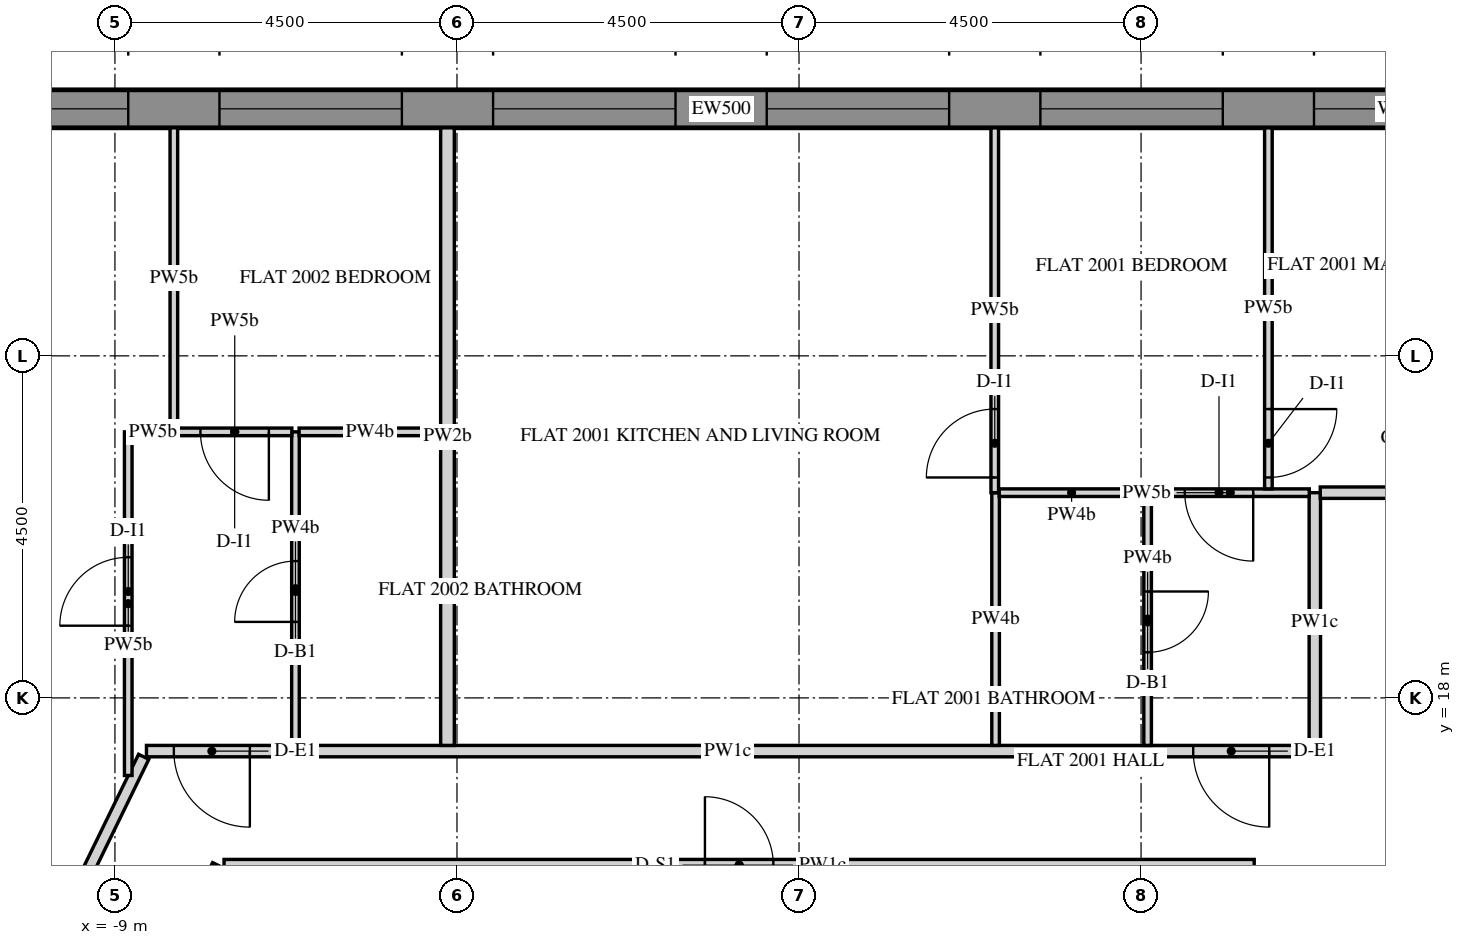
"""IFC4 building model, lengths in metres.
Left out: names, types, materials, properties, quantities, classifications, styles, units other than length and angle.
Written with IfcOpenShell. Run it as: python <this file> out.ifc"""

import sys

from ifc_helpers import new_model, si_unit, direction, frame, frame_2d, origin, place, context, subcontext, project, spatial, polyline, rectangle, outline, extrude, element, fill, save


model = new_model("IFC4")
c1 = context("Model", 3, precision=1e-05, world=origin(), true_north=direction((0.0, 1.0)))
c2 = subcontext(c1, "Body", "Model", "MODEL_VIEW")
j1 = project(units=[si_unit("LENGTHUNIT", "METRE"), si_unit("PLANEANGLEUNIT", "RADIAN")], contexts=[c1])
p1 = place(None, origin())
s1 = spatial("IfcSite", under=j1, at=p1, CompositionType="ELEMENT")
p2 = place(p1, origin())
s2 = spatial("IfcBuilding", under=s1, at=p2, CompositionType="ELEMENT")
p3 = place(p2, frame((0.0, 0.0, 260.1)))
s3 = spatial("IfcBuildingStorey", under=s2, at=p3, CompositionType="ELEMENT", Elevation=260.1)
p4 = place(p3, frame((11.698, 25.75, -0.15), z_axis=(0.0, 0.0, 1.0), x_axis=(-1.0, 0.0, 0.0)))
e1 = element("IfcWall", 1, at=p4, inside=s3, PredefinedType="SOLIDWALL", context=c2, shape_type="SweptSolid", body=[
    extrude(outline(polyline([(-0.021, -0.25), (25.468, -0.25), (25.421, 0.25), (0.021, 0.25), (-0.021, -0.25)])), origin(), (0.0, 0.0, 1.0), 3.9),
])
p5 = place(p4, frame((2.522, 0.0, 0.75)))
e2 = element("IfcOpeningElement", 2, at=p5, cuts=e1, PredefinedType="OPENING", context=c2, shape_type="SweptSolid", body=[
    extrude(rectangle(XDim=2.4, YDim=2.7, at=frame_2d((1.2, 1.35))), frame((0.0, 0.26, 0.0), z_axis=(0.0, -1.0, 0.0), x_axis=(1.0, 0.0, 0.0)), (0.0, 0.0, 1.0), 0.52),
])
p6 = place(p4, frame((6.122, 0.0, 0.75)))
e3 = element("IfcOpeningElement", 3, at=p6, cuts=e1, PredefinedType="OPENING", context=c2, shape_type="SweptSolid", body=[
    extrude(rectangle(XDim=2.4, YDim=2.7, at=frame_2d((1.2, 1.35))), frame((0.0, 0.26, 0.0), z_axis=(0.0, -1.0, 0.0), x_axis=(1.0, 0.0, 0.0)), (0.0, 0.0, 1.0), 0.52),
])
p7 = place(p4, frame((9.722, 0.0, 0.75)))
e4 = element("IfcOpeningElement", 4, at=p7, cuts=e1, PredefinedType="OPENING", context=c2, shape_type="SweptSolid", body=[
    extrude(rectangle(XDim=2.4, YDim=2.7, at=frame_2d((1.2, 1.35))), frame((0.0, 0.26, 0.0), z_axis=(0.0, -1.0, 0.0), x_axis=(1.0, 0.0, 0.0)), (0.0, 0.0, 1.0), 0.52),
])
p8 = place(p4, frame((13.323, 0.0, 0.75)))
e5 = element("IfcOpeningElement", 5, at=p8, cuts=e1, PredefinedType="OPENING", context=c2, shape_type="SweptSolid", body=[
    extrude(rectangle(XDim=2.4, YDim=2.7, at=frame_2d((1.2, 1.35))), frame((0.0, 0.26, 0.0), z_axis=(0.0, -1.0, 0.0), x_axis=(1.0, 0.0, 0.0)), (0.0, 0.0, 1.0), 0.52),
])
p9 = place(p4, frame((16.922, 0.0, 0.75)))
e6 = element("IfcOpeningElement", 6, at=p9, cuts=e1, PredefinedType="OPENING", context=c2, shape_type="SweptSolid", body=[
    extrude(rectangle(XDim=2.4, YDim=2.7, at=frame_2d((1.2, 1.35))), frame((0.0, 0.26, 0.0), z_axis=(0.0, -1.0, 0.0), x_axis=(1.0, 0.0, 0.0)), (0.0, 0.0, 1.0), 0.52),
])
p10 = place(p4, frame((20.522, 0.0, 0.75)))
e7 = element("IfcOpeningElement", 7, at=p10, cuts=e1, PredefinedType="OPENING", context=c2, shape_type="SweptSolid", body=[
    extrude(rectangle(XDim=2.4, YDim=2.7, at=frame_2d((1.2, 1.35))), frame((0.0, 0.26, 0.0), z_axis=(0.0, -1.0, 0.0), x_axis=(1.0, 0.0, 0.0)), (0.0, 0.0, 1.0), 0.52),
])
p11 = place(p3, frame((6.351, 11.0, -0.15), z_axis=(0.0, 0.0, 1.0), x_axis=(0.499998894578, 0.866026041999, 0.0)))
e8 = element("IfcWall", 8, at=p11, inside=s3, PredefinedType="SHEAR", context=c2, shape_type="SweptSolid", body=[
    extrude(rectangle(XDim=15.544, YDim=0.4, at=frame_2d((7.772, 0.0))), origin(), (0.0, 0.0, 1.0), 3.9),
])
p12 = place(p11, frame((6.872, 0.0, 0.15)))
e9 = element("IfcOpeningElement", 9, at=p12, cuts=e8, PredefinedType="OPENING", context=c2, shape_type="SweptSolid", body=[
    extrude(rectangle(XDim=1.8, YDim=2.4, at=frame_2d((0.9, 1.2))), frame((0.0, 0.21, 0.0), z_axis=(0.0, -1.0, 0.0), x_axis=(1.0, 0.0, 0.0)), (0.0, 0.0, 1.0), 0.42),
])
p13 = place(p3, frame((6.711, 17.3, 0.0), z_axis=(0.0, 0.0, 1.0), x_axis=(-1.0, 0.0, 0.0)))
e10 = element("IfcWall", 10, at=p13, inside=s3, PredefinedType="PARTITIONING", context=c2, shape_type="SweptSolid", body=[
    extrude(rectangle(XDim=15.296, YDim=0.15, at=frame_2d((7.648, 0.0))), origin(), (0.0, 0.0, 1.0), 2.823),
])
p14 = place(p13, frame((0.525, 0.0, 0.0)))
e11 = element("IfcOpeningElement", 11, at=p14, cuts=e10, PredefinedType="OPENING", context=c2, shape_type="SweptSolid", body=[
    extrude(rectangle(XDim=1.0, YDim=2.1, at=frame_2d((0.5, 1.05))), frame((0.0, 0.085, 0.0), z_axis=(0.0, -1.0, 0.0), x_axis=(1.0, 0.0, 0.0)), (0.0, 0.0, 1.0), 0.17),
])
p15 = place(p13, frame((13.936, 0.0, 0.0)))
e12 = element("IfcOpeningElement", 12, at=p15, cuts=e10, PredefinedType="OPENING", context=c2, shape_type="SweptSolid", body=[
    extrude(rectangle(XDim=1.0, YDim=2.1, at=frame_2d((0.5, 1.05))), frame((0.0, 0.085, 0.0), z_axis=(0.0, -1.0, 0.0), x_axis=(1.0, 0.0, 0.0)), (0.0, 0.0, 1.0), 0.17),
])
p16 = place(p3, frame((6.786, 20.7, 0.0), z_axis=(0.0, 0.0, 1.0), x_axis=(0.0, -1.0, 0.0)))
e13 = element("IfcWall", 13, at=p16, inside=s3, PredefinedType="PARTITIONING", context=c2, shape_type="SweptSolid", body=[
    extrude(rectangle(XDim=3.4, YDim=0.15, at=frame_2d((1.7, 0.0))), origin(), (0.0, 0.0, 1.0), 2.823),
])
p17 = place(p3, frame((9.774, 20.7, 0.0), z_axis=(0.0, 0.0, 1.0), x_axis=(-1.0, 0.0, 0.0)))
e14 = element("IfcWall", 14, at=p17, inside=s3, PredefinedType="PARTITIONING", context=c2, shape_type="SweptSolid", body=[
    extrude(rectangle(XDim=2.916, YDim=0.15, at=frame_2d((1.458, 0.0))), origin(), (0.0, 0.0, 1.0), 2.823),
])
p18 = place(p3, frame((-8.622, 17.225, 0.0), z_axis=(0.0, 0.0, 1.0), x_axis=(-0.438366544921, -0.898796290765, 0.0)))
e15 = element("IfcWall", 15, at=p18, inside=s3, PredefinedType="PARTITIONING", context=c2, shape_type="SweptSolid", body=[
    extrude(rectangle(XDim=17.273, YDim=0.15, at=frame_2d((8.637, 0.0))), origin(), (0.0, 0.0, 1.0), 2.823),
])
p19 = place(p18, frame((6.478, 0.0, 0.0)))
e16 = element("IfcOpeningElement", 16, at=p19, cuts=e15, PredefinedType="OPENING", context=c2, shape_type="SweptSolid", body=[
    extrude(rectangle(XDim=1.0, YDim=2.1, at=frame_2d((0.5, 1.05))), frame((0.0, 0.085, 0.0), z_axis=(0.0, -1.0, 0.0), x_axis=(1.0, 0.0, 0.0)), (0.0, 0.0, 1.0), 0.17),
])
p20 = place(p3, frame((-11.499, 7.905, 0.0), z_axis=(0.0, 0.0, 1.0), x_axis=(0.438365041944, 0.898797023805, 0.0)))
e17 = element("IfcWall", 17, at=p20, inside=s3, PredefinedType="PARTITIONING", context=c2, shape_type="SweptSolid", body=[
    extrude(rectangle(XDim=8.784, YDim=0.15, at=frame_2d((4.392, 0.0))), origin(), (0.0, 0.0, 1.0), 2.823),
])
p21 = place(p3, frame((-7.564, 15.8, 0.0), z_axis=(0.0, 0.0, 1.0), x_axis=(1.0, 0.0, 0.0)))
e18 = element("IfcWall", 18, at=p21, inside=s3, PredefinedType="PARTITIONING", context=c2, shape_type="SweptSolid", body=[
    extrude(rectangle(XDim=13.553, YDim=0.15, at=frame_2d((6.776, 0.0))), origin(), (0.0, 0.0, 1.0), 2.823),
])
p22 = place(p21, frame((6.326, 0.0, 0.0)))
e19 = element("IfcOpeningElement", 19, at=p22, cuts=e18, PredefinedType="OPENING", context=c2, shape_type="SweptSolid", body=[
    extrude(rectangle(XDim=0.9, YDim=2.1, at=frame_2d((0.45, 1.05))), frame((0.0, 0.085, 0.0), z_axis=(0.0, -1.0, 0.0), x_axis=(1.0, 0.0, 0.0)), (0.0, 0.0, 1.0), 0.17),
])
p23 = place(p3, frame((2.586, 17.375, 0.0), z_axis=(0.0, 0.0, 1.0), x_axis=(0.0, 1.0, 0.0)))
e20 = element("IfcWall", 20, at=p23, inside=s3, PredefinedType="PARTITIONING", context=c2, shape_type="SweptSolid", body=[
    extrude(rectangle(XDim=3.325, YDim=0.1, at=frame_2d((1.663, 0.0))), origin(), (0.0, 0.0, 1.0), 2.823),
])
p24 = place(p3, frame((2.575, 20.7, 0.0), z_axis=(0.0, 0.0, 1.0), x_axis=(0.0, 1.0, 0.0)))
e21 = element("IfcWall", 21, at=p24, inside=s3, PredefinedType="PARTITIONING", context=c2, shape_type="SweptSolid", body=[
    extrude(rectangle(XDim=4.8, YDim=0.1, at=frame_2d((2.4, 0.0))), origin(), (0.0, 0.0, 1.0), 2.823),
])
p25 = place(p24, frame((0.2, 0.0, 0.0)))
e22 = element("IfcOpeningElement", 22, at=p25, cuts=e21, PredefinedType="OPENING", context=c2, shape_type="SweptSolid", body=[
    extrude(rectangle(XDim=0.9, YDim=2.1, at=frame_2d((0.45, 1.05))), frame((0.0, 0.06, 0.0), z_axis=(0.0, -1.0, 0.0), x_axis=(1.0, 0.0, 0.0)), (0.0, 0.0, 1.0), 0.12),
])
p26 = place(p3, frame((-4.625, 25.5, 0.0), z_axis=(0.0, 0.0, 1.0), x_axis=(0.0, -1.0, 0.0)))
e23 = element("IfcWall", 23, at=p26, inside=s3, PredefinedType="PARTITIONING", context=c2, shape_type="SweptSolid", body=[
    extrude(rectangle(XDim=8.125, YDim=0.18, at=frame_2d((4.062, 0.0))), origin(), (0.0, 0.0, 1.0), 2.823),
])
p27 = place(p3, frame((4.586, 20.7, 0.0), z_axis=(0.0, 0.0, 1.0), x_axis=(0.0, -1.0, 0.0)))
e24 = element("IfcWall", 24, at=p27, inside=s3, PredefinedType="PARTITIONING", context=c2, shape_type="SweptSolid", body=[
    extrude(rectangle(XDim=3.325, YDim=0.1, at=frame_2d((1.663, 0.0))), origin(), (0.0, 0.0, 1.0), 2.823),
])
p28 = place(p27, frame((1.3, 0.0, 0.0)))
e25 = element("IfcOpeningElement", 25, at=p28, cuts=e24, PredefinedType="OPENING", context=c2, shape_type="SweptSolid", body=[
    extrude(rectangle(XDim=0.8, YDim=2.1, at=frame_2d((0.4, 1.05))), frame((0.0, 0.06, 0.0), z_axis=(0.0, -1.0, 0.0), x_axis=(1.0, 0.0, 0.0)), (0.0, 0.0, 1.0), 0.12),
])
p29 = place(p3, frame((6.713, 20.7, 0.0), z_axis=(0.0, 0.0, 1.0), x_axis=(-1.0, 0.0, 0.0)))
e26 = element("IfcWall", 26, at=p29, inside=s3, PredefinedType="PARTITIONING", context=c2, shape_type="SweptSolid", body=[
    extrude(rectangle(XDim=2.079, YDim=0.1, at=frame_2d((1.04, 0.0))), origin(), (0.0, 0.0, 1.0), 2.823),
])
p30 = place(p29, frame((0.738, 0.0, 0.0)))
e27 = element("IfcOpeningElement", 27, at=p30, cuts=e26, PredefinedType="OPENING", context=c2, shape_type="SweptSolid", body=[
    extrude(rectangle(XDim=0.9, YDim=2.1, at=frame_2d((0.45, 1.05))), frame((0.0, 0.06, 0.0), z_axis=(0.0, -1.0, 0.0), x_axis=(1.0, 0.0, 0.0)), (0.0, 0.0, 1.0), 0.12),
])
p31 = place(p3, frame((4.538, 20.7, 0.0), z_axis=(0.0, 0.0, 1.0), x_axis=(-1.0, 0.0, 0.0)))
e28 = element("IfcWall", 28, at=p31, inside=s3, PredefinedType="PARTITIONING", context=c2, shape_type="SweptSolid", body=[
    extrude(rectangle(XDim=1.904, YDim=0.1, at=frame_2d((0.952, 0.0))), origin(), (0.0, 0.0, 1.0), 2.823),
])
p32 = place(p3, frame((6.175, 25.5, 0.0), z_axis=(0.0, 0.0, 1.0), x_axis=(0.0, -1.0, 0.0)))
e29 = element("IfcWall", 29, at=p32, inside=s3, PredefinedType="PARTITIONING", context=c2, shape_type="SweptSolid", body=[
    extrude(rectangle(XDim=4.75, YDim=0.1, at=frame_2d((2.375, 0.0))), origin(), (0.0, 0.0, 1.0), 2.823),
])
p33 = place(p32, frame((3.7, 0.0, 0.0)))
e30 = element("IfcOpeningElement", 30, at=p33, cuts=e29, PredefinedType="OPENING", context=c2, shape_type="SweptSolid", body=[
    extrude(rectangle(XDim=0.9, YDim=2.1, at=frame_2d((0.45, 1.05))), frame((0.0, 0.06, 0.0), z_axis=(0.0, -1.0, 0.0), x_axis=(1.0, 0.0, 0.0)), (0.0, 0.0, 1.0), 0.12),
])
p34 = place(p3, frame((-8.825, 16.979, 0.0), z_axis=(0.0, 0.0, 1.0), x_axis=(0.0, 1.0, 0.0)))
e31 = element("IfcWall", 31, at=p34, inside=s3, PredefinedType="PARTITIONING", context=c2, shape_type="SweptSolid", body=[
    extrude(rectangle(XDim=4.521, YDim=0.1, at=frame_2d((2.26, 0.0))), origin(), (0.0, 0.0, 1.0), 2.823),
])
p35 = place(p34, frame((1.97, 0.0, 0.0)))
e32 = element("IfcOpeningElement", 32, at=p35, cuts=e31, PredefinedType="OPENING", context=c2, shape_type="SweptSolid", body=[
    extrude(rectangle(XDim=0.9, YDim=2.1, at=frame_2d((0.45, 1.05))), frame((0.0, 0.06, 0.0), z_axis=(0.0, -1.0, 0.0), x_axis=(1.0, 0.0, 0.0)), (0.0, 0.0, 1.0), 0.12),
])
p36 = place(p3, frame((-8.775, 21.5, 0.0), z_axis=(0.0, 0.0, 1.0), x_axis=(1.0, 0.0, 0.0)))
e33 = element("IfcWall", 33, at=p36, inside=s3, PredefinedType="PARTITIONING", context=c2, shape_type="SweptSolid", body=[
    extrude(rectangle(XDim=0.552, YDim=0.1, at=frame_2d((0.276, 0.0))), origin(), (0.0, 0.0, 1.0), 2.823),
])
p37 = place(p3, frame((-8.225, 21.55, 0.0), z_axis=(0.0, 0.0, 1.0), x_axis=(0.0, 1.0, 0.0)))
e34 = element("IfcWall", 34, at=p37, inside=s3, PredefinedType="PARTITIONING", context=c2, shape_type="SweptSolid", body=[
    extrude(rectangle(XDim=3.95, YDim=0.1, at=frame_2d((1.975, 0.0))), origin(), (0.0, 0.0, 1.0), 2.823),
])
p38 = place(p3, frame((-6.625, 17.375, 0.0), z_axis=(0.0, 0.0, 1.0), x_axis=(0.0, 1.0, 0.0)))
e35 = element("IfcWall", 35, at=p38, inside=s3, PredefinedType="PARTITIONING", context=c2, shape_type="SweptSolid", body=[
    extrude(rectangle(XDim=4.125, YDim=0.1, at=frame_2d((2.062, 0.0))), origin(), (0.0, 0.0, 1.0), 2.823),
])
p39 = place(p38, frame((1.625, 0.0, 0.0)))
e36 = element("IfcOpeningElement", 36, at=p39, cuts=e35, PredefinedType="OPENING", context=c2, shape_type="SweptSolid", body=[
    extrude(rectangle(XDim=0.8, YDim=2.1, at=frame_2d((0.4, 1.05))), frame((0.0, 0.06, 0.0), z_axis=(0.0, -1.0, 0.0), x_axis=(1.0, 0.0, 0.0)), (0.0, 0.0, 1.0), 0.12),
])
p40 = place(p3, frame((-6.673, 21.5, 0.0), z_axis=(0.0, 0.0, 1.0), x_axis=(-1.0, 0.0, 0.0)))
e37 = element("IfcWall", 37, at=p40, inside=s3, PredefinedType="PARTITIONING", context=c2, shape_type="SweptSolid", body=[
    extrude(rectangle(XDim=1.502, YDim=0.1, at=frame_2d((0.751, 0.0))), origin(), (0.0, 0.0, 1.0), 2.823),
])
p41 = place(p40, frame((0.302, 0.0, 0.0)))
e38 = element("IfcOpeningElement", 38, at=p41, cuts=e37, PredefinedType="OPENING", context=c2, shape_type="SweptSolid", body=[
    extrude(rectangle(XDim=0.9, YDim=2.1, at=frame_2d((0.45, 1.05))), frame((0.0, 0.06, 0.0), z_axis=(0.0, -1.0, 0.0), x_axis=(1.0, 0.0, 0.0)), (0.0, 0.0, 1.0), 0.12),
])
p42 = place(p3, frame((-4.715, 21.5, 0.0), z_axis=(0.0, 0.0, 1.0), x_axis=(-1.0, 0.0, 0.0)))
e39 = element("IfcWall", 39, at=p42, inside=s3, PredefinedType="PARTITIONING", context=c2, shape_type="SweptSolid", body=[
    extrude(rectangle(XDim=1.862, YDim=0.1, at=frame_2d((0.931, 0.0))), origin(), (0.0, 0.0, 1.0), 2.823),
])
p43 = place(p5, frame((0.0, 0.18, 0.0)))
e40 = element("IfcWindow", 40, at=p43, inside=s3, PartitioningType="DOUBLE_PANEL_VERTICAL", PredefinedType="WINDOW", context=c2, shape_type="SweptSolid", body=[
    extrude(rectangle(XDim=2.4, YDim=2.7, at=frame_2d((1.2, 1.35))), frame((0.0, 0.03, 0.0), z_axis=(0.0, -1.0, 0.0), x_axis=(1.0, 0.0, 0.0)), (0.0, 0.0, 1.0), 0.06),
])
fill(e2, e40)
p44 = place(p6, frame((0.0, 0.18, 0.0)))
e41 = element("IfcWindow", 41, at=p44, inside=s3, PartitioningType="DOUBLE_PANEL_VERTICAL", PredefinedType="WINDOW", context=c2, shape_type="SweptSolid", body=[
    extrude(rectangle(XDim=2.4, YDim=2.7, at=frame_2d((1.2, 1.35))), frame((0.0, 0.03, 0.0), z_axis=(0.0, -1.0, 0.0), x_axis=(1.0, 0.0, 0.0)), (0.0, 0.0, 1.0), 0.06),
])
fill(e3, e41)
p45 = place(p7, frame((0.0, 0.18, 0.0)))
e42 = element("IfcWindow", 42, at=p45, inside=s3, PartitioningType="DOUBLE_PANEL_VERTICAL", PredefinedType="WINDOW", context=c2, shape_type="SweptSolid", body=[
    extrude(rectangle(XDim=2.4, YDim=2.7, at=frame_2d((1.2, 1.35))), frame((0.0, 0.03, 0.0), z_axis=(0.0, -1.0, 0.0), x_axis=(1.0, 0.0, 0.0)), (0.0, 0.0, 1.0), 0.06),
])
fill(e4, e42)
p46 = place(p8, frame((0.0, 0.18, 0.0)))
e43 = element("IfcWindow", 43, at=p46, inside=s3, PartitioningType="DOUBLE_PANEL_VERTICAL", PredefinedType="WINDOW", context=c2, shape_type="SweptSolid", body=[
    extrude(rectangle(XDim=2.4, YDim=2.7, at=frame_2d((1.2, 1.35))), frame((0.0, 0.03, 0.0), z_axis=(0.0, -1.0, 0.0), x_axis=(1.0, 0.0, 0.0)), (0.0, 0.0, 1.0), 0.06),
])
fill(e5, e43)
p47 = place(p9, frame((0.0, 0.18, 0.0)))
e44 = element("IfcWindow", 44, at=p47, inside=s3, PartitioningType="DOUBLE_PANEL_VERTICAL", PredefinedType="WINDOW", context=c2, shape_type="SweptSolid", body=[
    extrude(rectangle(XDim=2.4, YDim=2.7, at=frame_2d((1.2, 1.35))), frame((0.0, 0.03, 0.0), z_axis=(0.0, -1.0, 0.0), x_axis=(1.0, 0.0, 0.0)), (0.0, 0.0, 1.0), 0.06),
])
fill(e6, e44)
p48 = place(p10, frame((0.0, 0.18, 0.0)))
e45 = element("IfcWindow", 45, at=p48, inside=s3, PartitioningType="DOUBLE_PANEL_VERTICAL", PredefinedType="WINDOW", context=c2, shape_type="SweptSolid", body=[
    extrude(rectangle(XDim=2.4, YDim=2.7, at=frame_2d((1.2, 1.35))), frame((0.0, 0.03, 0.0), z_axis=(0.0, -1.0, 0.0), x_axis=(1.0, 0.0, 0.0)), (0.0, 0.0, 1.0), 0.06),
])
fill(e7, e45)
p49 = place(p14, origin())
e46 = element("IfcDoor", 46, at=p49, inside=s3, OperationType="SINGLE_SWING_RIGHT", PredefinedType="DOOR", context=c2, shape_type="SweptSolid", body=[
    extrude(rectangle(XDim=1.0, YDim=2.1, at=frame_2d((0.5, 1.05))), frame((0.0, 0.025, 0.0), z_axis=(0.0, -1.0, 0.0), x_axis=(1.0, 0.0, 0.0)), (0.0, 0.0, 1.0), 0.05),
])
fill(e11, e46)
p50 = place(p28, origin())
e47 = element("IfcDoor", 47, at=p50, inside=s3, OperationType="SINGLE_SWING_LEFT", PredefinedType="DOOR", context=c2, shape_type="SweptSolid", body=[
    extrude(rectangle(XDim=0.8, YDim=2.1, at=frame_2d((0.4, 1.05))), frame((0.0, 0.025, 0.0), z_axis=(0.0, -1.0, 0.0), x_axis=(1.0, 0.0, 0.0)), (0.0, 0.0, 1.0), 0.05),
])
fill(e25, e47)
p51 = place(p30, origin())
e48 = element("IfcDoor", 48, at=p51, inside=s3, OperationType="SINGLE_SWING_RIGHT", PredefinedType="DOOR", context=c2, shape_type="SweptSolid", body=[
    extrude(rectangle(XDim=0.9, YDim=2.1, at=frame_2d((0.45, 1.05))), frame((0.0, 0.025, 0.0), z_axis=(0.0, -1.0, 0.0), x_axis=(1.0, 0.0, 0.0)), (0.0, 0.0, 1.0), 0.05),
])
fill(e27, e48)
p52 = place(p33, origin())
e49 = element("IfcDoor", 49, at=p52, inside=s3, OperationType="SINGLE_SWING_RIGHT", PredefinedType="DOOR", context=c2, shape_type="SweptSolid", body=[
    extrude(rectangle(XDim=0.9, YDim=2.1, at=frame_2d((0.45, 1.05))), frame((0.0, 0.025, 0.0), z_axis=(0.0, -1.0, 0.0), x_axis=(1.0, 0.0, 0.0)), (0.0, 0.0, 1.0), 0.05),
])
fill(e30, e49)
p53 = place(p25, origin())
e50 = element("IfcDoor", 50, at=p53, inside=s3, OperationType="SINGLE_SWING_RIGHT", PredefinedType="DOOR", context=c2, shape_type="SweptSolid", body=[
    extrude(rectangle(XDim=0.9, YDim=2.1, at=frame_2d((0.45, 1.05))), frame((0.0, 0.025, 0.0), z_axis=(0.0, -1.0, 0.0), x_axis=(1.0, 0.0, 0.0)), (0.0, 0.0, 1.0), 0.05),
])
fill(e22, e50)
p54 = place(p15, origin())
e51 = element("IfcDoor", 51, at=p54, inside=s3, OperationType="SINGLE_SWING_LEFT", PredefinedType="DOOR", context=c2, shape_type="SweptSolid", body=[
    extrude(rectangle(XDim=1.0, YDim=2.1, at=frame_2d((0.5, 1.05))), frame((0.0, 0.025, 0.0), z_axis=(0.0, -1.0, 0.0), x_axis=(1.0, 0.0, 0.0)), (0.0, 0.0, 1.0), 0.05),
])
fill(e12, e51)
p55 = place(p39, origin())
e52 = element("IfcDoor", 52, at=p55, inside=s3, OperationType="SINGLE_SWING_RIGHT", PredefinedType="DOOR", context=c2, shape_type="SweptSolid", body=[
    extrude(rectangle(XDim=0.8, YDim=2.1, at=frame_2d((0.4, 1.05))), frame((0.0, 0.025, 0.0), z_axis=(0.0, -1.0, 0.0), x_axis=(1.0, 0.0, 0.0)), (0.0, 0.0, 1.0), 0.05),
])
fill(e36, e52)
p56 = place(p35, origin())
e53 = element("IfcDoor", 53, at=p56, inside=s3, OperationType="SINGLE_SWING_LEFT", PredefinedType="DOOR", context=c2, shape_type="SweptSolid", body=[
    extrude(rectangle(XDim=0.9, YDim=2.1, at=frame_2d((0.45, 1.05))), frame((0.0, 0.025, 0.0), z_axis=(0.0, -1.0, 0.0), x_axis=(1.0, 0.0, 0.0)), (0.0, 0.0, 1.0), 0.05),
])
fill(e32, e53)
p57 = place(p41, origin())
e54 = element("IfcDoor", 54, at=p57, inside=s3, OperationType="SINGLE_SWING_RIGHT", PredefinedType="DOOR", context=c2, shape_type="SweptSolid", body=[
    extrude(rectangle(XDim=0.9, YDim=2.1, at=frame_2d((0.45, 1.05))), frame((0.0, 0.025, 0.0), z_axis=(0.0, -1.0, 0.0), x_axis=(1.0, 0.0, 0.0)), (0.0, 0.0, 1.0), 0.05),
])
fill(e38, e54)
p58 = place(p22, origin())
e55 = element("IfcDoor", 55, at=p58, inside=s3, OperationType="SINGLE_SWING_LEFT", PredefinedType="DOOR", context=c2, shape_type="SweptSolid", body=[
    extrude(rectangle(XDim=0.9, YDim=2.1, at=frame_2d((0.45, 1.05))), frame((0.0, 0.025, 0.0), z_axis=(0.0, -1.0, 0.0), x_axis=(1.0, 0.0, 0.0)), (0.0, 0.0, 1.0), 0.05),
])
fill(e19, e55)
save(model, sys.argv[1])
